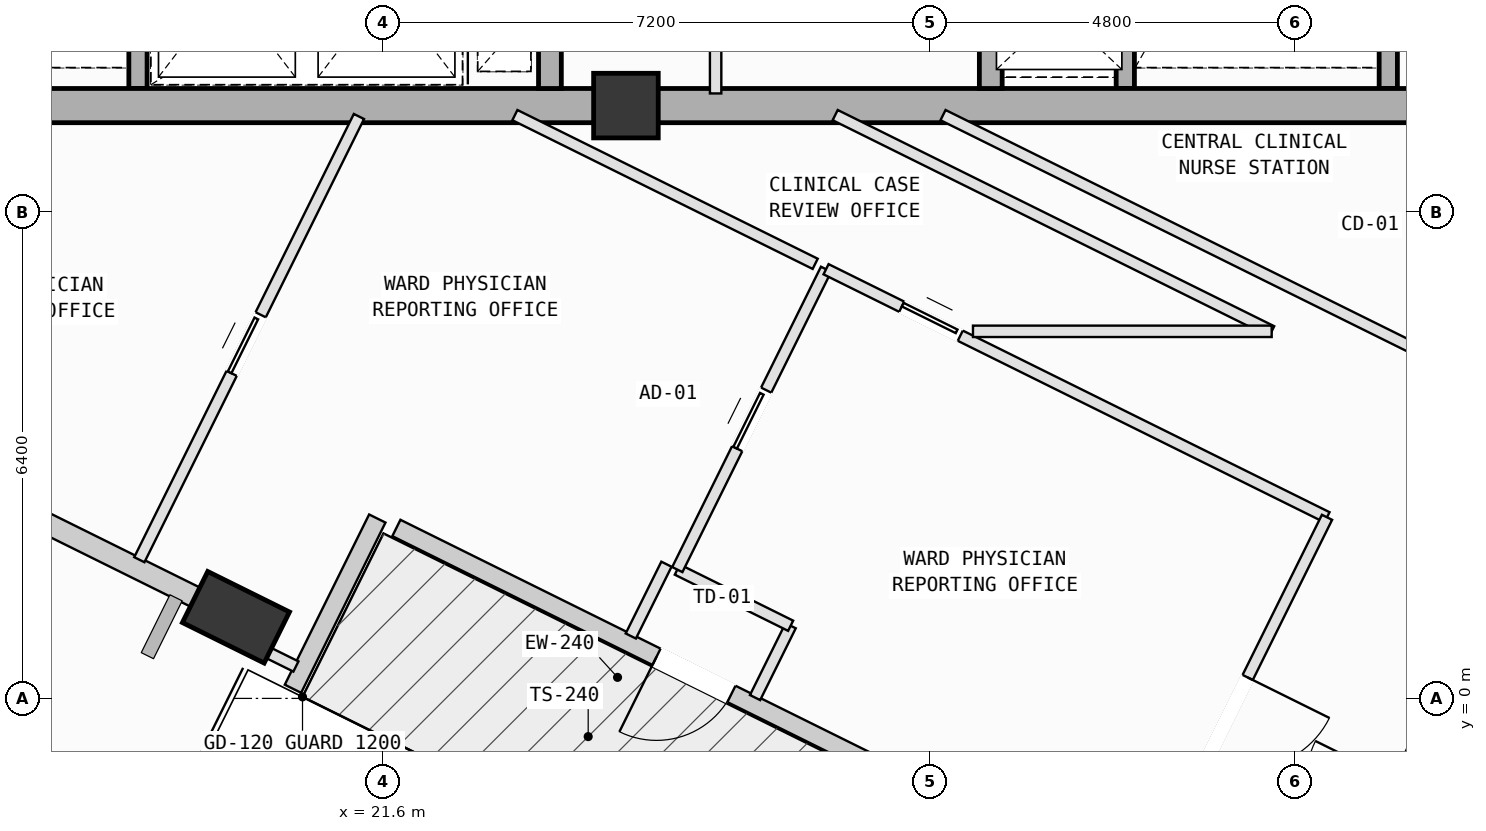
"""IFC4 building model, lengths in metres.
Left out: names, types, materials, properties, quantities, classifications, styles, units other than length and angle.
Written with IfcOpenShell. Run it as: python <this file> out.ifc"""

import sys

from ifc_helpers import new_model, si_unit, direction, frame, frame_2d, origin, origin_2d, place, context, subcontext, project, spatial, rectangle, extrude, element, fill, save


model = new_model("IFC4")
c1 = context("Model", 3, precision=1e-05, world=origin(), true_north=direction((0.0, 1.0)))
c2 = subcontext(c1, "Body", "Model", "MODEL_VIEW")
j1 = project(units=[si_unit("LENGTHUNIT", "METRE"), si_unit("PLANEANGLEUNIT", "RADIAN")], contexts=[c1])
p1 = place(None, origin())
s1 = spatial("IfcSite", under=j1, at=p1, CompositionType="ELEMENT")
p2 = place(p1, origin())
s2 = spatial("IfcBuilding", under=s1, at=p2, CompositionType="ELEMENT")
p3 = place(p2, frame((0.0, 0.0, 296.6)))
s3 = spatial("IfcBuildingStorey", under=s2, at=p3, CompositionType="ELEMENT", Elevation=296.6)
p4 = place(p3, frame((24.8, 7.8, 0.0), z_axis=(0.0, 0.0, 1.0), x_axis=(1.0, 0.0, 0.0)))
e1 = element("IfcColumn", 1, at=p4, inside=s3, PredefinedType="COLUMN", context=c2, shape_type="SweptSolid", body=[
    extrude(rectangle(XDim=0.85, YDim=0.85, at=origin_2d()), origin(), (0.0, 0.0, 1.0), 4.0),
])
p5 = place(p3, frame((19.669, 1.067, 0.002), z_axis=(0.098208825475, -0.056509528132, 0.993560113848), x_axis=(-0.829149129966, -0.55676072121, 0.05029134711)))
e2 = element("IfcColumn", 2, at=p5, inside=s3, PredefinedType="COLUMN", context=c2, shape_type="SweptSolid", body=[
    extrude(rectangle(XDim=1.2, YDim=0.75, at=origin_2d()), origin(), (0.0, 0.0, 1.0), 4.022),
])
p6 = place(p3, frame((28.017, -0.846, 0.0), z_axis=(0.0, 0.0, 1.0), x_axis=(-0.89610459949, 0.443842930296, 0.0)))
e3 = element("IfcWall", 3, at=p6, inside=s3, PredefinedType="SOLIDWALL", context=c2, shape_type="SweptSolid", body=[
    extrude(rectangle(XDim=6.96, YDim=0.24, at=frame_2d((3.48, 0.0))), origin(), (0.0, 0.0, 1.0), 3.265),
])
p7 = place(p6, frame((2.04, 0.0, 0.0)))
e4 = element("IfcOpeningElement", 4, at=p7, cuts=e3, PredefinedType="OPENING", context=c2, shape_type="SweptSolid", body=[
    extrude(rectangle(XDim=1.1, YDim=2.15, at=frame_2d((0.55, 1.075))), frame((0.0, 0.13, 0.0), z_axis=(0.0, -1.0, 0.0), x_axis=(1.0, 0.0, 0.0)), (0.0, 0.0, 1.0), 0.26),
])
p8 = place(p3, frame((21.529, 2.367, 0.0), z_axis=(0.0, 0.0, 1.0), x_axis=(-0.443851040461, -0.896100582458, 0.0)))
e5 = element("IfcWall", 5, at=p8, inside=s3, PredefinedType="SOLIDWALL", context=c2, shape_type="SweptSolid", body=[
    extrude(rectangle(XDim=2.5, YDim=0.24, at=frame_2d((1.25, 0.0))), origin(), (0.0, 0.0, 1.0), 3.265),
])
p9 = place(p3, frame((19.517, 1.143, 0.0), z_axis=(0.0, 0.0, 1.0), x_axis=(-0.896103760266, 0.443844624658, 0.0)))
e6 = element("IfcWall", 6, at=p9, inside=s3, PredefinedType="SOLIDWALL", context=c2, shape_type="SweptSolid", body=[
    extrude(rectangle(XDim=5.861, YDim=0.28, at=frame_2d((2.93, 0.0))), origin(), (0.0, 0.0, 1.0), 3.245),
])
p10 = place(p9, frame((2.967, 0.0, 0.75)))
e7 = element("IfcOpeningElement", 7, at=p10, cuts=e6, PredefinedType="OPENING", context=c2, shape_type="SweptSolid", body=[
    extrude(rectangle(XDim=1.6, YDim=1.95, at=frame_2d((0.8, 0.975))), frame((0.0, 0.15, 0.0), z_axis=(0.0, -1.0, 0.0), x_axis=(1.0, 0.0, 0.0)), (0.0, 0.0, 1.0), 0.3),
])
for number, where, z_axis, x_axis in (
    (8, (18.38, 15.12, 0.0), (0.0, 0.0, 1.0), (0.0, -1.0, 0.0)),
    (9, (34.83, 15.12, 0.0), (0.0, 0.0, 1.0), (0.0, -1.0, 0.0)),
    (10, (31.37, 8.025, 0.0), (0.0, 0.0, 1.0), (0.0, 1.0, 0.0)),
):
    element("IfcWall", number, at=place(p3, frame(where, z_axis=z_axis, x_axis=x_axis)), inside=s3, PredefinedType="SOLIDWALL", context=c2, shape_type="SweptSolid", body=[
        extrude(rectangle(XDim=7.095, YDim=0.24, at=frame_2d((3.548, 0.0))), origin(), (0.0, 0.0, 1.0), 3.78),
    ])
for number, where, z_axis, x_axis in (
    (11, (14.0, 7.8, 0.0), (0.0, 0.0, 1.0), (1.0, 0.0, 0.0)),
    (12, (24.8, 7.8, 0.0), (0.0, 0.0, 1.0), (1.0, 0.0, 0.0)),
):
    element("IfcWall", number, at=place(p3, frame(where, z_axis=z_axis, x_axis=x_axis)), inside=s3, PredefinedType="SHEAR", context=c2, shape_type="SweptSolid", body=[
        extrude(rectangle(XDim=10.8, YDim=0.45, at=frame_2d((5.4, 0.0))), origin(), (0.0, 0.0, 1.0), 3.78),
    ])
p11 = place(p3, frame((23.8, 8.025, 0.0), z_axis=(0.0, 0.0, 1.0), x_axis=(0.0, 1.0, 0.0)))
e13 = element("IfcWall", 13, at=p11, inside=s3, PredefinedType="SOLIDWALL", context=c2, shape_type="SweptSolid", body=[
    extrude(rectangle(XDim=2.655, YDim=0.3, at=frame_2d((1.328, 0.0))), origin(), (0.0, 0.0, 1.0), 3.78),
])
p12 = place(p3, frame((29.6, 8.025, 0.0), z_axis=(0.0, 0.0, 1.0), x_axis=(0.0, 1.0, 0.0)))
e14 = element("IfcWall", 14, at=p12, inside=s3, PredefinedType="SOLIDWALL", context=c2, shape_type="SweptSolid", body=[
    extrude(rectangle(XDim=1.995, YDim=0.3, at=frame_2d((0.998, 0.0))), origin(), (0.0, 0.0, 1.0), 3.78),
])
p13 = place(p3, frame((25.98, 7.96, 0.0), z_axis=(0.0, 0.0, 1.0), x_axis=(0.0, 1.0, 0.0)))
e15 = element("IfcWall", 15, at=p13, inside=s3, PredefinedType="PARTITIONING", context=c2, shape_type="SweptSolid", body=[
    extrude(rectangle(XDim=4.04, YDim=0.15, at=frame_2d((2.02, 0.0))), origin(), (0.0, 0.0, 1.0), 3.78),
])
p14 = place(p13, frame((1.695, 0.0, 0.0)))
e16 = element("IfcOpeningElement", 16, at=p14, cuts=e15, PredefinedType="OPENING", context=c2, shape_type="SweptSolid", body=[
    extrude(rectangle(XDim=1.0, YDim=2.12, at=frame_2d((0.5, 1.06))), frame((0.0, 0.085, 0.0), z_axis=(0.0, -1.0, 0.0), x_axis=(1.0, 0.0, 0.0)), (0.0, 0.0, 1.0), 0.17),
])
p15 = place(p3, frame((32.852, -5.323, 0.0), z_axis=(0.0, 0.0, 1.0), x_axis=(0.443904145744, 0.896074276716, 0.0)))
e17 = element("IfcWall", 17, at=p15, inside=s3, PredefinedType="PARTITIONING", context=c2, shape_type="SweptSolid", body=[
    extrude(rectangle(XDim=8.24, YDim=0.15, at=frame_2d((4.12, 0.0))), origin(), (0.0, 0.0, 1.0), 3.78),
])
p16 = place(p15, frame((3.52, 0.0, 0.0)))
e18 = element("IfcOpeningElement", 18, at=p16, cuts=e17, PredefinedType="OPENING", context=c2, shape_type="SweptSolid", body=[
    extrude(rectangle(XDim=1.2, YDim=2.15, at=frame_2d((0.6, 1.075))), frame((0.0, 0.085, 0.0), z_axis=(0.0, -1.0, 0.0), x_axis=(1.0, 0.0, 0.0)), (0.0, 0.0, 1.0), 0.17),
])
p17 = place(p3, frame((26.499, 0.011, 0.0), z_axis=(0.0, 0.0, 1.0), x_axis=(0.443784125016, 0.896133723494, 0.0)))
e19 = element("IfcWall", 19, at=p17, inside=s3, PredefinedType="PARTITIONING", context=c2, shape_type="SweptSolid", body=[
    extrude(rectangle(XDim=1.055, YDim=0.15, at=frame_2d((0.527, 0.0))), origin(), (0.0, 0.0, 1.0), 3.78),
])
p18 = place(p3, frame((26.967, 0.956, 0.0), z_axis=(0.0, 0.0, 1.0), x_axis=(-0.89597694194, 0.444100573645, 0.0)))
e20 = element("IfcWall", 20, at=p18, inside=s3, PredefinedType="PARTITIONING", context=c2, shape_type="SweptSolid", body=[
    extrude(rectangle(XDim=1.664, YDim=0.15, at=frame_2d((0.832, 0.0))), origin(), (0.0, 0.0, 1.0), 3.78),
])
p19 = place(p3, frame((25.476, 1.695, 0.0), z_axis=(0.0, 0.0, 1.0), x_axis=(0.443777888659, 0.896136811842, 0.0)))
e21 = element("IfcWall", 21, at=p19, inside=s3, PredefinedType="PARTITIONING", context=c2, shape_type="SweptSolid", body=[
    extrude(rectangle(XDim=4.41, YDim=0.15, at=frame_2d((2.205, 0.0))), origin(), (0.0, 0.0, 1.0), 3.78),
])
p20 = place(p19, frame((1.775, 0.0, 0.0)))
e22 = element("IfcOpeningElement", 22, at=p20, cuts=e21, PredefinedType="OPENING", context=c2, shape_type="SweptSolid", body=[
    extrude(rectangle(XDim=0.86, YDim=2.06, at=frame_2d((0.43, 1.03))), frame((0.0, 0.085, 0.0), z_axis=(0.0, -1.0, 0.0), x_axis=(1.0, 0.0, 0.0)), (0.0, 0.0, 1.0), 0.17),
])
p21 = place(p3, frame((27.433, 5.647, 0.0), z_axis=(0.0, 0.0, 1.0), x_axis=(0.896133495003, -0.443784586409, 0.0)))
e23 = element("IfcWall", 23, at=p21, inside=s3, PredefinedType="PARTITIONING", context=c2, shape_type="SweptSolid", body=[
    extrude(rectangle(XDim=7.355, YDim=0.15, at=frame_2d((3.677, 0.0))), origin(), (0.0, 0.0, 1.0), 3.78),
])
p22 = place(p21, frame((1.111, 0.0, 0.0)))
e24 = element("IfcOpeningElement", 24, at=p22, cuts=e23, PredefinedType="OPENING", context=c2, shape_type="SweptSolid", body=[
    extrude(rectangle(XDim=0.86, YDim=2.06, at=frame_2d((0.43, 1.03))), frame((0.0, 0.085, 0.0), z_axis=(0.0, -1.0, 0.0), x_axis=(1.0, 0.0, 0.0)), (0.0, 0.0, 1.0), 0.17),
])
p23 = place(p3, frame((34.024, 2.383, 0.0), z_axis=(0.0, 0.0, 1.0), x_axis=(-0.443802528377, -0.896124609531, 0.0)))
e25 = element("IfcWall", 25, at=p23, inside=s3, PredefinedType="PARTITIONING", context=c2, shape_type="SweptSolid", body=[
    extrude(rectangle(XDim=5.903, YDim=0.15, at=frame_2d((2.952, 0.0))), origin(), (0.0, 0.0, 1.0), 3.78),
])
p24 = place(p23, frame((2.352, 0.0, 0.0)))
e26 = element("IfcOpeningElement", 26, at=p24, cuts=e25, PredefinedType="OPENING", context=c2, shape_type="SweptSolid", body=[
    extrude(rectangle(XDim=1.2, YDim=2.15, at=frame_2d((0.6, 1.075))), frame((0.0, 0.085, 0.0), z_axis=(0.0, -1.0, 0.0), x_axis=(1.0, 0.0, 0.0)), (0.0, 0.0, 1.0), 0.17),
])
p25 = place(p3, frame((25.333, 1.766, 0.0), z_axis=(0.0, 0.0, 1.0), x_axis=(-0.444527293858, -0.895765306883, 0.0)))
e27 = element("IfcWall", 27, at=p25, inside=s3, PredefinedType="PARTITIONING", context=c2, shape_type="SweptSolid", body=[
    extrude(rectangle(XDim=1.055, YDim=0.15, at=frame_2d((0.527, 0.0))), origin(), (0.0, 0.0, 1.0), 3.78),
])
p26 = place(p3, frame((20.458, 0.42, 0.0), z_axis=(0.0, 0.0, 1.0), x_axis=(-0.895932090446, 0.44419105046, 0.0)))
e28 = element("IfcWall", 28, at=p26, inside=s3, PredefinedType="PARTITIONING", context=c2, shape_type="SweptSolid", body=[
    extrude(rectangle(XDim=1.164, YDim=0.15, at=frame_2d((0.582, 0.0))), origin(), (0.0, 0.0, 1.0), 3.245),
])
p27 = place(p3, frame((18.398, 1.825, 0.0), z_axis=(0.0, 0.0, 1.0), x_axis=(0.443909549261, 0.89607159986, 0.0)))
e29 = element("IfcWall", 29, at=p27, inside=s3, PredefinedType="PARTITIONING", context=c2, shape_type="SweptSolid", body=[
    extrude(rectangle(XDim=6.509, YDim=0.15, at=frame_2d((3.254, 0.0))), origin(), (0.0, 0.0, 1.0), 3.78),
])
p28 = place(p27, frame((2.737, 0.0, 0.0)))
e30 = element("IfcOpeningElement", 30, at=p28, cuts=e29, PredefinedType="OPENING", context=c2, shape_type="SweptSolid", body=[
    extrude(rectangle(XDim=0.86, YDim=2.06, at=frame_2d((0.43, 1.03))), frame((0.0, 0.085, 0.0), z_axis=(0.0, -1.0, 0.0), x_axis=(1.0, 0.0, 0.0)), (0.0, 0.0, 1.0), 0.17),
])
p29 = place(p3, frame((23.339, 7.675, 0.0), z_axis=(0.0, 0.0, 1.0), x_axis=(0.896093187534, -0.443865969923, 0.0)))
e31 = element("IfcWall", 31, at=p29, inside=s3, PredefinedType="PARTITIONING", context=c2, shape_type="SweptSolid", body=[
    extrude(rectangle(XDim=4.409, YDim=0.15, at=frame_2d((2.205, 0.0))), origin(), (0.0, 0.0, 1.0), 3.78),
])
p30 = place(p3, frame((37.15, 8.761, 0.0), z_axis=(0.0, 0.0, 1.0), x_axis=(-0.443815988883, -0.896117943137, 0.0)))
e32 = element("IfcWall", 32, at=p30, inside=s3, PredefinedType="PARTITIONING", context=c2, shape_type="SweptSolid", body=[
    extrude(rectangle(XDim=4.603, YDim=0.15, at=frame_2d((2.302, 0.0))), origin(), (0.0, 0.0, 1.0), 3.78),
])
p31 = place(p30, frame((2.715, 0.0, 0.0)))
e33 = element("IfcOpeningElement", 33, at=p31, cuts=e32, PredefinedType="OPENING", context=c2, shape_type="SweptSolid", body=[
    extrude(rectangle(XDim=1.0, YDim=2.12, at=frame_2d((0.5, 1.06))), frame((0.0, 0.085, 0.0), z_axis=(0.0, -1.0, 0.0), x_axis=(1.0, 0.0, 0.0)), (0.0, 0.0, 1.0), 0.17),
])
p32 = place(p3, frame((35.107, 4.636, 0.0), z_axis=(0.0, 0.0, 1.0), x_axis=(-0.8960827402, 0.443887060767, 0.0)))
e34 = element("IfcWall", 34, at=p32, inside=s3, PredefinedType="PARTITIONING", context=c2, shape_type="SweptSolid", body=[
    extrude(rectangle(XDim=6.846, YDim=0.15, at=frame_2d((3.423, 0.0))), origin(), (0.0, 0.0, 1.0), 3.78),
])
p33 = place(p3, frame((27.553, 7.675, 0.0), z_axis=(0.0, 0.0, 1.0), x_axis=(0.896074338839, -0.443904020341, 0.0)))
e35 = element("IfcWall", 35, at=p33, inside=s3, PredefinedType="PARTITIONING", context=c2, shape_type="SweptSolid", body=[
    extrude(rectangle(XDim=6.409, YDim=0.15, at=frame_2d((3.205, 0.0))), origin(), (0.0, 0.0, 1.0), 3.78),
])
p34 = place(p3, frame((33.296, 4.83, 0.0), z_axis=(0.0, 0.0, 1.0), x_axis=(-1.0, 0.0, 0.0)))
e36 = element("IfcWall", 36, at=p34, inside=s3, PredefinedType="PARTITIONING", context=c2, shape_type="SweptSolid", body=[
    extrude(rectangle(XDim=3.93, YDim=0.15, at=frame_2d((1.965, 0.0))), origin(), (0.0, 0.0, 1.0), 3.78),
])
p35 = place(p7, origin())
e37 = element("IfcDoor", 37, at=p35, inside=s3, OperationType="SINGLE_SWING_RIGHT", PredefinedType="DOOR", context=c2, shape_type="SweptSolid", body=[
    extrude(rectangle(XDim=1.1, YDim=2.15, at=frame_2d((0.55, 1.075))), frame((0.0, 0.025, 0.0), z_axis=(0.0, -1.0, 0.0), x_axis=(1.0, 0.0, 0.0)), (0.0, 0.0, 1.0), 0.05),
])
fill(e4, e37)
p36 = place(p24, origin())
e38 = element("IfcDoor", 38, at=p36, inside=s3, OperationType="SINGLE_SWING_LEFT", PredefinedType="DOOR", context=c2, shape_type="SweptSolid", body=[
    extrude(rectangle(XDim=1.2, YDim=2.15, at=frame_2d((0.6, 1.075))), frame((0.0, 0.025, 0.0), z_axis=(0.0, -1.0, 0.0), x_axis=(1.0, 0.0, 0.0)), (0.0, 0.0, 1.0), 0.05),
])
fill(e26, e38)
p37 = place(p20, origin())
e39 = element("IfcDoor", 39, at=p37, inside=s3, OperationType="SLIDING_TO_LEFT", PredefinedType="DOOR", context=c2, shape_type="SweptSolid", body=[
    extrude(rectangle(XDim=0.86, YDim=2.06, at=frame_2d((0.43, 1.03))), frame((0.0, 0.025, 0.0), z_axis=(0.0, -1.0, 0.0), x_axis=(1.0, 0.0, 0.0)), (0.0, 0.0, 1.0), 0.05),
])
fill(e22, e39)
p38 = place(p22, origin())
e40 = element("IfcDoor", 40, at=p38, inside=s3, OperationType="SLIDING_TO_LEFT", PredefinedType="DOOR", context=c2, shape_type="SweptSolid", body=[
    extrude(rectangle(XDim=0.86, YDim=2.06, at=frame_2d((0.43, 1.03))), frame((0.0, 0.025, 0.0), z_axis=(0.0, -1.0, 0.0), x_axis=(1.0, 0.0, 0.0)), (0.0, 0.0, 1.0), 0.05),
])
fill(e24, e40)
p39 = place(p28, origin())
e41 = element("IfcDoor", 41, at=p39, inside=s3, OperationType="SLIDING_TO_LEFT", PredefinedType="DOOR", context=c2, shape_type="SweptSolid", body=[
    extrude(rectangle(XDim=0.86, YDim=2.06, at=frame_2d((0.43, 1.03))), frame((0.0, 0.025, 0.0), z_axis=(0.0, -1.0, 0.0), x_axis=(1.0, 0.0, 0.0)), (0.0, 0.0, 1.0), 0.05),
])
fill(e30, e41)
save(model, sys.argv[1])
